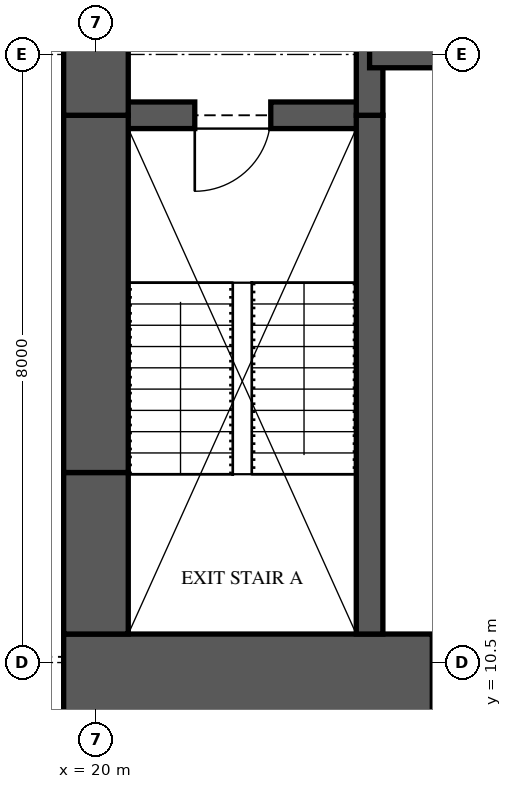
"""IFC4 building model, lengths in metres.
Left out: names, types, materials, properties, quantities, classifications, styles, units other than length and angle.
Written with IfcOpenShell. Run it as: python <this file> out.ifc"""

import sys

from ifc_helpers import new_model, si_unit, direction, frame, frame_2d, origin, place, context, subcontext, project, spatial, rectangle, extrude, element, fill, save


model = new_model("IFC4")
c1 = context("Model", 3, precision=1e-05, world=origin(), true_north=direction((0.0, 1.0)))
c2 = subcontext(c1, "Body", "Model", "MODEL_VIEW")
j1 = project(units=[si_unit("LENGTHUNIT", "METRE"), si_unit("PLANEANGLEUNIT", "RADIAN")], contexts=[c1])
p1 = place(None, origin())
s1 = spatial("IfcSite", under=j1, at=p1, CompositionType="ELEMENT")
p2 = place(p1, origin())
s2 = spatial("IfcBuilding", under=s1, at=p2, CompositionType="ELEMENT")
p3 = place(p2, frame((0.0, 0.0, 108.2)))
s3 = spatial("IfcBuildingStorey", under=s2, at=p3, CompositionType="ELEMENT", Elevation=108.2)
p4 = place(p3, frame((19.575, 10.125, 0.0), z_axis=(0.0, 0.0, 1.0), x_axis=(1.0, 0.0, 0.0)))
e1 = element("IfcWall", 1, at=p4, inside=s3, PredefinedType="SHEAR", context=c2, shape_type="SweptSolid", body=[
    extrude(rectangle(XDim=6.425, YDim=1.5, at=frame_2d((3.212, 0.0))), origin(), (0.0, 0.0, 1.0), 3.35),
])
p5 = place(p4, frame((4.85, 0.0, 0.0)))
e2 = element("IfcOpeningElement", 2, at=p5, cuts=e1, PredefinedType="OPENING", context=c2, shape_type="SweptSolid", body=[
    extrude(rectangle(XDim=0.75, YDim=2.1, at=frame_2d((0.375, 1.05))), frame((0.0, 0.76, 0.0), z_axis=(0.0, -1.0, 0.0), x_axis=(1.0, 0.0, 0.0)), (0.0, 0.0, 1.0), 1.52),
])
p6 = place(p3, frame((20.0, 23.3, 0.0), z_axis=(0.0, 0.0, 1.0), x_axis=(0.0, -1.0, 0.0)))
e3 = element("IfcWall", 3, at=p6, inside=s3, PredefinedType="SHEAR", context=c2, shape_type="SweptSolid", body=[
    extrude(rectangle(XDim=5.6, YDim=0.85, at=frame_2d((2.8, 0.0))), origin(), (0.0, 0.0, 1.0), 3.35),
])
p7 = place(p6, frame((3.4, 0.0, 0.0)))
e4 = element("IfcOpeningElement", 4, at=p7, cuts=e3, PredefinedType="OPENING", context=c2, shape_type="SweptSolid", body=[
    extrude(rectangle(XDim=1.2, YDim=2.2, at=frame_2d((0.6, 1.1))), frame((0.0, 0.435, 0.0), z_axis=(0.0, -1.0, 0.0), x_axis=(1.0, 0.0, 0.0)), (0.0, 0.0, 1.0), 0.87),
])
p8 = place(p3, frame((20.0, 17.7, 0.0), z_axis=(0.0, 0.0, 1.0), x_axis=(0.0, -1.0, 0.0)))
e5 = element("IfcWall", 5, at=p8, inside=s3, PredefinedType="SHEAR", context=c2, shape_type="SweptSolid", body=[
    extrude(rectangle(XDim=4.7, YDim=0.85, at=frame_2d((2.35, 0.0))), origin(), (0.0, 0.0, 1.0), 3.35),
])
p9 = place(p3, frame((20.0, 13.0, 0.0), z_axis=(0.0, 0.0, 1.0), x_axis=(0.0, -1.0, 0.0)))
e6 = element("IfcWall", 6, at=p9, inside=s3, PredefinedType="SHEAR", context=c2, shape_type="SweptSolid", body=[
    extrude(rectangle(XDim=2.125, YDim=0.85, at=frame_2d((1.062, 0.0))), origin(), (0.0, 0.0, 1.0), 3.35),
])
p10 = place(p3, frame((23.6, 10.875, 0.0), z_axis=(0.0, 0.0, 1.0), x_axis=(0.0, 1.0, 0.0)))
e7 = element("IfcWall", 7, at=p10, inside=s3, PredefinedType="SHEAR", context=c2, shape_type="SweptSolid", body=[
    extrude(rectangle(XDim=6.825, YDim=0.35, at=frame_2d((3.413, 0.0))), origin(), (0.0, 0.0, 1.0), 3.35),
])
p11 = place(p3, frame((23.6, 17.7, 0.0), z_axis=(0.0, 0.0, 1.0), x_axis=(0.0, 1.0, 0.0)))
e8 = element("IfcWall", 8, at=p11, inside=s3, PredefinedType="SHEAR", context=c2, shape_type="SweptSolid", body=[
    extrude(rectangle(XDim=5.6, YDim=0.35, at=frame_2d((2.8, 0.0))), origin(), (0.0, 0.0, 1.0), 3.35),
])
p12 = place(p3, frame((20.0, 17.7, 0.0), z_axis=(0.0, 0.0, 1.0), x_axis=(1.0, 0.0, 0.0)))
e9 = element("IfcWall", 9, at=p12, inside=s3, PredefinedType="SHEAR", context=c2, shape_type="SweptSolid", body=[
    extrude(rectangle(XDim=3.6, YDim=0.35, at=frame_2d((1.8, 0.0))), origin(), (0.0, 0.0, 1.0), 3.35),
])
p13 = place(p12, frame((1.3, 0.0, 0.0)))
e10 = element("IfcOpeningElement", 10, at=p13, cuts=e9, PredefinedType="OPENING", context=c2, shape_type="SweptSolid", body=[
    extrude(rectangle(XDim=1.0, YDim=2.1, at=frame_2d((0.5, 1.05))), frame((0.0, 0.185, 0.0), z_axis=(0.0, -1.0, 0.0), x_axis=(1.0, 0.0, 0.0)), (0.0, 0.0, 1.0), 0.37),
])
p14 = place(p3, frame((23.6, 18.5, 0.0), z_axis=(0.0, 0.0, 1.0), x_axis=(1.0, 0.0, 0.0)))
e11 = element("IfcWall", 11, at=p14, inside=s3, PredefinedType="SHEAR", context=c2, shape_type="SweptSolid", body=[
    extrude(rectangle(XDim=2.4, YDim=0.35, at=frame_2d((1.2, 0.0))), origin(), (0.0, 0.0, 1.0), 3.35),
])
p15 = place(p13, frame((1.0, 0.0, 0.0), z_axis=(0.0, 0.0, 1.0), x_axis=(-1.0, 0.0, 0.0)))
e12 = element("IfcDoor", 12, at=p15, inside=s3, OperationType="SINGLE_SWING_RIGHT", PredefinedType="DOOR", context=c2, shape_type="SweptSolid", body=[
    extrude(rectangle(XDim=1.0, YDim=2.1, at=frame_2d((0.5, 1.05))), frame((0.0, 0.025, 0.0), z_axis=(0.0, -1.0, 0.0), x_axis=(1.0, 0.0, 0.0)), (0.0, 0.0, 1.0), 0.05),
])
fill(e10, e12)
save(model, sys.argv[1])
